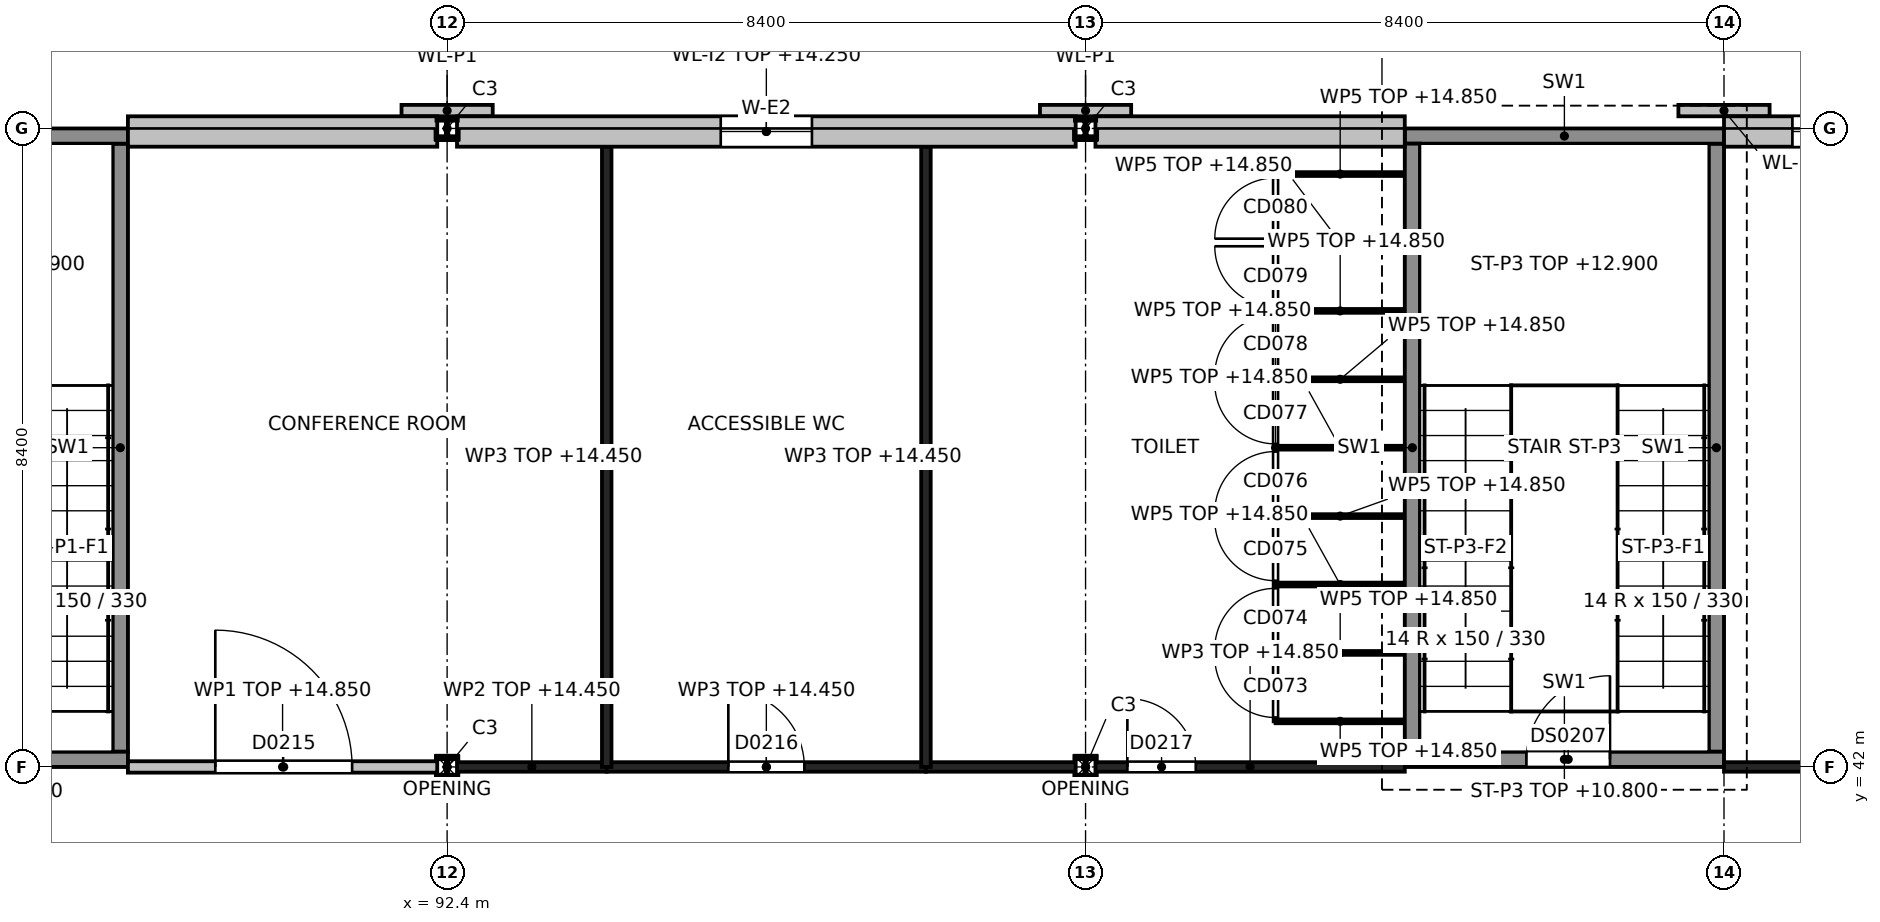
"""IFC4 building model, lengths in metres.
Left out: names, types, materials, properties, quantities, classifications, styles, units other than length and angle.
Written with IfcOpenShell. Run it as: python <this file> out.ifc"""

import sys

from ifc_helpers import new_model, si_unit, direction, frame, frame_2d, origin, origin_2d, place, context, subcontext, project, spatial, rectangle, i_section, extrude, element, fill, save


model = new_model("IFC4")
c1 = context("Model", 3, precision=1e-05, world=origin(), true_north=direction((0.0, 1.0)))
c2 = subcontext(c1, "Body", "Model", "MODEL_VIEW")
j1 = project(units=[si_unit("LENGTHUNIT", "METRE"), si_unit("PLANEANGLEUNIT", "RADIAN")], contexts=[c1])
p1 = place(None, origin())
s1 = spatial("IfcSite", under=j1, at=p1, CompositionType="ELEMENT")
p2 = place(p1, origin())
s2 = spatial("IfcBuilding", under=s1, at=p2, CompositionType="ELEMENT")
p3 = place(p2, frame((0.0, 0.0, 10.8)))
s3 = spatial("IfcBuildingStorey", under=s2, at=p3, CompositionType="ELEMENT", Elevation=10.8)
for number, where, z_axis, x_axis in (
    (1, (92.4, 42.0, 0.0), (0.0, 0.0, 1.0), (1.0, 0.0, 0.0)),
    (2, (92.4, 50.4, 0.0), (0.0, 0.0, 1.0), (1.0, 0.0, 0.0)),
    (3, (100.8, 42.0, 0.0), (0.0, 0.0, 1.0), (1.0, 0.0, 0.0)),
    (4, (100.8, 50.4, 0.0), (0.0, 0.0, 1.0), (1.0, 0.0, 0.0)),
):
    element("IfcColumn", number, at=place(p3, frame(where, z_axis=z_axis, x_axis=x_axis)), inside=s3, PredefinedType="COLUMN", context=c2, shape_type="SweptSolid", body=[
        extrude(i_section(OverallWidth=0.26, OverallDepth=0.26, WebThickness=0.01, FlangeThickness=0.018, at=origin_2d()), origin(), (0.0, 0.0, 1.0), 4.2),
    ])
p4 = place(p3, frame((84.0, 42.1, 0.0), z_axis=(0.0, 0.0, 1.0), x_axis=(1.0, 0.0, 0.0)))
e5 = element("IfcWall", 5, at=p4, inside=s3, PredefinedType="SHEAR", context=c2, shape_type="SweptSolid", body=[
    extrude(rectangle(XDim=4.2, YDim=0.2, at=frame_2d((2.1, 0.0))), origin(), (0.0, 0.0, 1.0), 4.2),
])
p5 = place(p4, frame((1.6, 0.0, 0.0)))
e6 = element("IfcOpeningElement", 6, at=p5, cuts=e5, PredefinedType="OPENING", context=c2, shape_type="SweptSolid", body=[
    extrude(rectangle(XDim=1.1, YDim=2.1, at=frame_2d((0.55, 1.05))), frame((0.0, 0.1, 0.0), z_axis=(0.0, -1.0, 0.0), x_axis=(1.0, 0.0, 0.0)), (0.0, 0.0, 1.0), 0.2),
])
p6 = place(p3, frame((84.0, 50.3, 0.0), z_axis=(0.0, 0.0, 1.0), x_axis=(1.0, 0.0, 0.0)))
e7 = element("IfcWall", 7, at=p6, inside=s3, PredefinedType="SHEAR", context=c2, shape_type="SweptSolid", body=[
    extrude(rectangle(XDim=4.2, YDim=0.2, at=frame_2d((2.1, 0.0))), origin(), (0.0, 0.0, 1.0), 4.2),
])
p7 = place(p3, frame((88.1, 42.2, 0.0), z_axis=(0.0, 0.0, 1.0), x_axis=(0.0, 1.0, 0.0)))
e8 = element("IfcWall", 8, at=p7, inside=s3, PredefinedType="SHEAR", context=c2, shape_type="SweptSolid", body=[
    extrude(rectangle(XDim=8.0, YDim=0.2, at=frame_2d((4.0, 0.0))), origin(), (0.0, 0.0, 1.0), 4.2),
])
p8 = place(p3, frame((105.0, 42.1, 0.0), z_axis=(0.0, 0.0, 1.0), x_axis=(1.0, 0.0, 0.0)))
e9 = element("IfcWall", 9, at=p8, inside=s3, PredefinedType="SHEAR", context=c2, shape_type="SweptSolid", body=[
    extrude(rectangle(XDim=4.2, YDim=0.2, at=frame_2d((2.1, 0.0))), origin(), (0.0, 0.0, 1.0), 4.2),
])
p9 = place(p8, frame((1.6, 0.0, 0.0)))
e10 = element("IfcOpeningElement", 10, at=p9, cuts=e9, PredefinedType="OPENING", context=c2, shape_type="SweptSolid", body=[
    extrude(rectangle(XDim=1.1, YDim=2.1, at=frame_2d((0.55, 1.05))), frame((0.0, 0.1, 0.0), z_axis=(0.0, -1.0, 0.0), x_axis=(1.0, 0.0, 0.0)), (0.0, 0.0, 1.0), 0.2),
])
p10 = place(p3, frame((105.0, 50.3, 0.0), z_axis=(0.0, 0.0, 1.0), x_axis=(1.0, 0.0, 0.0)))
e11 = element("IfcWall", 11, at=p10, inside=s3, PredefinedType="SHEAR", context=c2, shape_type="SweptSolid", body=[
    extrude(rectangle(XDim=4.2, YDim=0.2, at=frame_2d((2.1, 0.0))), origin(), (0.0, 0.0, 1.0), 4.2),
])
for number, where, z_axis, x_axis in (
    (12, (105.1, 42.2, 0.0), (0.0, 0.0, 1.0), (0.0, 1.0, 0.0)),
    (13, (109.1, 42.2, 0.0), (0.0, 0.0, 1.0), (0.0, 1.0, 0.0)),
):
    element("IfcWall", number, at=place(p3, frame(where, z_axis=z_axis, x_axis=x_axis)), inside=s3, PredefinedType="SHEAR", context=c2, shape_type="SweptSolid", body=[
        extrude(rectangle(XDim=8.0, YDim=0.2, at=frame_2d((4.0, 0.0))), origin(), (0.0, 0.0, 1.0), 4.2),
    ])
p11 = place(p3, frame((88.2, 50.36, 0.0), z_axis=(0.0, 0.0, 1.0), x_axis=(1.0, 0.0, 0.0)))
e14 = element("IfcWall", 14, at=p11, inside=s3, PredefinedType="SOLIDWALL", context=c2, shape_type="SweptSolid", body=[
    extrude(rectangle(XDim=4.07, YDim=0.4, at=frame_2d((2.035, 0.0))), origin(), (0.0, 0.0, 1.0), 3.45),
])
p12 = place(p3, frame((92.53, 50.36, 0.0), z_axis=(0.0, 0.0, 1.0), x_axis=(1.0, 0.0, 0.0)))
e15 = element("IfcWall", 15, at=p12, inside=s3, PredefinedType="SOLIDWALL", context=c2, shape_type="SweptSolid", body=[
    extrude(rectangle(XDim=8.14, YDim=0.4, at=frame_2d((4.07, 0.0))), origin(), (0.0, 0.0, 1.0), 3.45),
])
p13 = place(p12, frame((3.47, 0.0, 0.9)))
e16 = element("IfcOpeningElement", 16, at=p13, cuts=e15, PredefinedType="OPENING", context=c2, shape_type="SweptSolid", body=[
    extrude(rectangle(XDim=1.2, YDim=2.4, at=frame_2d((0.6, 1.2))), frame((0.0, 0.2, 0.0), z_axis=(0.0, -1.0, 0.0), x_axis=(1.0, 0.0, 0.0)), (0.0, 0.0, 1.0), 0.4),
])
p14 = place(p3, frame((100.93, 50.36, 0.0), z_axis=(0.0, 0.0, 1.0), x_axis=(1.0, 0.0, 0.0)))
e17 = element("IfcWall", 17, at=p14, inside=s3, PredefinedType="SOLIDWALL", context=c2, shape_type="SweptSolid", body=[
    extrude(rectangle(XDim=4.07, YDim=0.4, at=frame_2d((2.035, 0.0))), origin(), (0.0, 0.0, 1.0), 3.45),
])
p15 = place(p3, frame((109.2, 50.36, 0.0), z_axis=(0.0, 0.0, 1.0), x_axis=(1.0, 0.0, 0.0)))
e18 = element("IfcWall", 18, at=p15, inside=s3, PredefinedType="SOLIDWALL", context=c2, shape_type="SweptSolid", body=[
    extrude(rectangle(XDim=8.27, YDim=0.4, at=frame_2d((4.135, 0.0))), origin(), (0.0, 0.0, 1.0), 3.45),
])
p16 = place(p15, frame((0.9, 0.0, 0.9)))
e19 = element("IfcOpeningElement", 19, at=p16, cuts=e18, PredefinedType="OPENING", context=c2, shape_type="SweptSolid", body=[
    extrude(rectangle(XDim=3.0, YDim=2.4, at=frame_2d((1.5, 1.2))), frame((0.0, 0.2, 0.0), z_axis=(0.0, -1.0, 0.0), x_axis=(1.0, 0.0, 0.0)), (0.0, 0.0, 1.0), 0.4),
])
p17 = place(p15, frame((4.5, 0.0, 0.9)))
e20 = element("IfcOpeningElement", 20, at=p17, cuts=e18, PredefinedType="OPENING", context=c2, shape_type="SweptSolid", body=[
    extrude(rectangle(XDim=3.0, YDim=2.4, at=frame_2d((1.5, 1.2))), frame((0.0, 0.2, 0.0), z_axis=(0.0, -1.0, 0.0), x_axis=(1.0, 0.0, 0.0)), (0.0, 0.0, 1.0), 0.4),
])
for number, where, z_axis, x_axis in (
    (21, (91.8, 50.635, 0.0), (0.0, 0.0, 1.0), (1.0, 0.0, 0.0)),
    (22, (100.2, 50.635, 0.0), (0.0, 0.0, 1.0), (1.0, 0.0, 0.0)),
    (23, (108.6, 50.635, 0.0), (0.0, 0.0, 1.0), (1.0, 0.0, 0.0)),
):
    element("IfcWall", number, at=place(p3, frame(where, z_axis=z_axis, x_axis=x_axis)), inside=s3, PredefinedType="SOLIDWALL", context=c2, shape_type="SweptSolid", body=[
        extrude(rectangle(XDim=1.2, YDim=0.15, at=frame_2d((0.6, 0.0))), origin(), (0.0, 0.0, 1.0), 4.2),
    ])
p18 = place(p3, frame((88.2, 42.0, 0.0), z_axis=(0.0, 0.0, 1.0), x_axis=(1.0, 0.0, 0.0)))
e24 = element("IfcWall", 24, at=p18, inside=s3, PredefinedType="PARTITIONING", context=c2, shape_type="SweptSolid", body=[
    extrude(rectangle(XDim=4.07, YDim=0.15, at=frame_2d((2.035, 0.0))), origin(), (0.0, 0.0, 1.0), 4.05),
])
p19 = place(p18, frame((1.15, 0.0, 0.0)))
e25 = element("IfcOpeningElement", 25, at=p19, cuts=e24, PredefinedType="OPENING", context=c2, shape_type="SweptSolid", body=[
    extrude(rectangle(XDim=1.8, YDim=2.1, at=frame_2d((0.9, 1.05))), frame((0.0, 0.075, 0.0), z_axis=(0.0, -1.0, 0.0), x_axis=(1.0, 0.0, 0.0)), (0.0, 0.0, 1.0), 0.15),
])
p20 = place(p3, frame((92.53, 42.0, 0.0), z_axis=(0.0, 0.0, 1.0), x_axis=(1.0, 0.0, 0.0)))
e26 = element("IfcWall", 26, at=p20, inside=s3, PredefinedType="PARTITIONING", context=c2, shape_type="SweptSolid", body=[
    extrude(rectangle(XDim=1.97, YDim=0.125, at=frame_2d((0.985, 0.0))), origin(), (0.0, 0.0, 1.0), 3.65),
])
p21 = place(p3, frame((94.5, 42.0, 0.0), z_axis=(0.0, 0.0, 1.0), x_axis=(1.0, 0.0, 0.0)))
e27 = element("IfcWall", 27, at=p21, inside=s3, PredefinedType="PARTITIONING", context=c2, shape_type="SweptSolid", body=[
    extrude(rectangle(XDim=4.2, YDim=0.125, at=frame_2d((2.1, 0.0))), origin(), (0.0, 0.0, 1.0), 3.65),
])
p22 = place(p21, frame((1.6, 0.0, 0.0)))
e28 = element("IfcOpeningElement", 28, at=p22, cuts=e27, PredefinedType="OPENING", context=c2, shape_type="SweptSolid", body=[
    extrude(rectangle(XDim=1.0, YDim=2.1, at=frame_2d((0.5, 1.05))), frame((0.0, 0.062, 0.0), z_axis=(0.0, -1.0, 0.0), x_axis=(1.0, 0.0, 0.0)), (0.0, 0.0, 1.0), 0.125),
])
p23 = place(p3, frame((98.7, 42.0, 0.0), z_axis=(0.0, 0.0, 1.0), x_axis=(1.0, 0.0, 0.0)))
e29 = element("IfcWall", 29, at=p23, inside=s3, PredefinedType="PARTITIONING", context=c2, shape_type="SweptSolid", body=[
    extrude(rectangle(XDim=1.97, YDim=0.125, at=frame_2d((0.985, 0.0))), origin(), (0.0, 0.0, 1.0), 3.65),
])
p24 = place(p3, frame((100.93, 42.0, 0.0), z_axis=(0.0, 0.0, 1.0), x_axis=(1.0, 0.0, 0.0)))
e30 = element("IfcWall", 30, at=p24, inside=s3, PredefinedType="PARTITIONING", context=c2, shape_type="SweptSolid", body=[
    extrude(rectangle(XDim=4.07, YDim=0.125, at=frame_2d((2.035, 0.0))), origin(), (0.0, 0.0, 1.0), 4.05),
])
p25 = place(p24, frame((0.42, 0.0, 0.0)))
e31 = element("IfcOpeningElement", 31, at=p25, cuts=e30, PredefinedType="OPENING", context=c2, shape_type="SweptSolid", body=[
    extrude(rectangle(XDim=0.9, YDim=2.1, at=frame_2d((0.45, 1.05))), frame((0.0, 0.062, 0.0), z_axis=(0.0, -1.0, 0.0), x_axis=(1.0, 0.0, 0.0)), (0.0, 0.0, 1.0), 0.125),
])
p26 = place(p3, frame((109.2, 42.0, 0.0), z_axis=(0.0, 0.0, 1.0), x_axis=(1.0, 0.0, 0.0)))
e32 = element("IfcWall", 32, at=p26, inside=s3, PredefinedType="PARTITIONING", context=c2, shape_type="SweptSolid", body=[
    extrude(rectangle(XDim=8.27, YDim=0.125, at=frame_2d((4.135, 0.0))), origin(), (0.0, 0.0, 1.0), 3.66),
])
p27 = place(p26, frame((3.25, 0.0, 0.0)))
e33 = element("IfcOpeningElement", 33, at=p27, cuts=e32, PredefinedType="OPENING", context=c2, shape_type="SweptSolid", body=[
    extrude(rectangle(XDim=1.8, YDim=2.1, at=frame_2d((0.9, 1.05))), frame((0.0, 0.062, 0.0), z_axis=(0.0, -1.0, 0.0), x_axis=(1.0, 0.0, 0.0)), (0.0, 0.0, 1.0), 0.125),
])
for number, where, z_axis, x_axis in (
    (34, (94.5, 42.0, 0.0), (0.0, 0.0, 1.0), (0.0, 1.0, 0.0)),
    (35, (98.7, 42.0, 0.0), (0.0, 0.0, 1.0), (0.0, 1.0, 0.0)),
):
    element("IfcWall", number, at=place(p3, frame(where, z_axis=z_axis, x_axis=x_axis)), inside=s3, PredefinedType="PARTITIONING", context=c2, shape_type="SweptSolid", body=[
        extrude(rectangle(XDim=8.159, YDim=0.125, at=frame_2d((4.08, 0.0))), origin(), (0.0, 0.0, 1.0), 3.65),
    ])
p28 = place(p3, frame((103.3, 42.6, 0.0), z_axis=(0.0, 0.0, 1.0), x_axis=(0.0, 1.0, 0.0)))
e36 = element("IfcWall", 36, at=p28, inside=s3, PredefinedType="PARTITIONING", context=c2, shape_type="SweptSolid", body=[
    extrude(rectangle(XDim=7.2, YDim=0.05, at=frame_2d((3.6, 0.0))), origin(), (0.0, 0.0, 1.0), 4.05),
])
p29 = place(p28, frame((0.05, 0.0, 0.0)))
e37 = element("IfcOpeningElement", 37, at=p29, cuts=e36, PredefinedType="OPENING", context=c2, shape_type="SweptSolid", body=[
    extrude(rectangle(XDim=0.8, YDim=2.0, at=frame_2d((0.4, 1.0))), frame((0.0, 0.025, 0.0), z_axis=(0.0, -1.0, 0.0), x_axis=(1.0, 0.0, 0.0)), (0.0, 0.0, 1.0), 0.05),
])
p30 = place(p28, frame((0.95, 0.0, 0.0)))
e38 = element("IfcOpeningElement", 38, at=p30, cuts=e36, PredefinedType="OPENING", context=c2, shape_type="SweptSolid", body=[
    extrude(rectangle(XDim=0.8, YDim=2.0, at=frame_2d((0.4, 1.0))), frame((0.0, 0.025, 0.0), z_axis=(0.0, -1.0, 0.0), x_axis=(1.0, 0.0, 0.0)), (0.0, 0.0, 1.0), 0.05),
])
p31 = place(p28, frame((1.85, 0.0, 0.0)))
e39 = element("IfcOpeningElement", 39, at=p31, cuts=e36, PredefinedType="OPENING", context=c2, shape_type="SweptSolid", body=[
    extrude(rectangle(XDim=0.8, YDim=2.0, at=frame_2d((0.4, 1.0))), frame((0.0, 0.025, 0.0), z_axis=(0.0, -1.0, 0.0), x_axis=(1.0, 0.0, 0.0)), (0.0, 0.0, 1.0), 0.05),
])
p32 = place(p28, frame((2.75, 0.0, 0.0)))
e40 = element("IfcOpeningElement", 40, at=p32, cuts=e36, PredefinedType="OPENING", context=c2, shape_type="SweptSolid", body=[
    extrude(rectangle(XDim=0.8, YDim=2.0, at=frame_2d((0.4, 1.0))), frame((0.0, 0.025, 0.0), z_axis=(0.0, -1.0, 0.0), x_axis=(1.0, 0.0, 0.0)), (0.0, 0.0, 1.0), 0.05),
])
p33 = place(p28, frame((3.65, 0.0, 0.0)))
e41 = element("IfcOpeningElement", 41, at=p33, cuts=e36, PredefinedType="OPENING", context=c2, shape_type="SweptSolid", body=[
    extrude(rectangle(XDim=0.8, YDim=2.0, at=frame_2d((0.4, 1.0))), frame((0.0, 0.025, 0.0), z_axis=(0.0, -1.0, 0.0), x_axis=(1.0, 0.0, 0.0)), (0.0, 0.0, 1.0), 0.05),
])
p34 = place(p28, frame((4.55, 0.0, 0.0)))
e42 = element("IfcOpeningElement", 42, at=p34, cuts=e36, PredefinedType="OPENING", context=c2, shape_type="SweptSolid", body=[
    extrude(rectangle(XDim=0.8, YDim=2.0, at=frame_2d((0.4, 1.0))), frame((0.0, 0.025, 0.0), z_axis=(0.0, -1.0, 0.0), x_axis=(1.0, 0.0, 0.0)), (0.0, 0.0, 1.0), 0.05),
])
p35 = place(p28, frame((5.45, 0.0, 0.0)))
e43 = element("IfcOpeningElement", 43, at=p35, cuts=e36, PredefinedType="OPENING", context=c2, shape_type="SweptSolid", body=[
    extrude(rectangle(XDim=0.8, YDim=2.0, at=frame_2d((0.4, 1.0))), frame((0.0, 0.025, 0.0), z_axis=(0.0, -1.0, 0.0), x_axis=(1.0, 0.0, 0.0)), (0.0, 0.0, 1.0), 0.05),
])
p36 = place(p28, frame((6.35, 0.0, 0.0)))
e44 = element("IfcOpeningElement", 44, at=p36, cuts=e36, PredefinedType="OPENING", context=c2, shape_type="SweptSolid", body=[
    extrude(rectangle(XDim=0.8, YDim=2.0, at=frame_2d((0.4, 1.0))), frame((0.0, 0.025, 0.0), z_axis=(0.0, -1.0, 0.0), x_axis=(1.0, 0.0, 0.0)), (0.0, 0.0, 1.0), 0.05),
])
for number, where, z_axis, x_axis in (
    (45, (105.0, 42.6, 0.0), (0.0, 0.0, 1.0), (-1.0, 0.0, 0.0)),
    (46, (105.0, 43.5, 0.0), (0.0, 0.0, 1.0), (-1.0, 0.0, 0.0)),
    (47, (105.0, 44.4, 0.0), (0.0, 0.0, 1.0), (-1.0, 0.0, 0.0)),
    (48, (105.0, 45.3, 0.0), (0.0, 0.0, 1.0), (-1.0, 0.0, 0.0)),
    (49, (105.0, 46.2, 0.0), (0.0, 0.0, 1.0), (-1.0, 0.0, 0.0)),
    (50, (105.0, 47.1, 0.0), (0.0, 0.0, 1.0), (-1.0, 0.0, 0.0)),
    (51, (105.0, 48.0, 0.0), (0.0, 0.0, 1.0), (-1.0, 0.0, 0.0)),
    (52, (105.0, 48.9, 0.0), (0.0, 0.0, 1.0), (-1.0, 0.0, 0.0)),
    (53, (105.0, 49.8, 0.0), (0.0, 0.0, 1.0), (-1.0, 0.0, 0.0)),
):
    element("IfcWall", number, at=place(p3, frame(where, z_axis=z_axis, x_axis=x_axis)), inside=s3, PredefinedType="PARTITIONING", context=c2, shape_type="SweptSolid", body=[
        extrude(rectangle(XDim=1.7, YDim=0.05, at=frame_2d((0.85, 0.0))), origin(), (0.0, 0.0, 1.0), 4.05),
    ])
p37 = place(p13, origin())
e54 = element("IfcWindow", 54, at=p37, inside=s3, PartitioningType="SINGLE_PANEL", PredefinedType="WINDOW", context=c2, shape_type="SweptSolid", body=[
    extrude(rectangle(XDim=1.2, YDim=2.4, at=frame_2d((0.6, 1.2))), frame((0.0, 0.03, 0.0), z_axis=(0.0, -1.0, 0.0), x_axis=(1.0, 0.0, 0.0)), (0.0, 0.0, 1.0), 0.06),
])
fill(e16, e54)
p38 = place(p16, origin())
e55 = element("IfcWindow", 55, at=p38, inside=s3, PartitioningType="SINGLE_PANEL", PredefinedType="WINDOW", context=c2, shape_type="SweptSolid", body=[
    extrude(rectangle(XDim=3.0, YDim=2.4, at=frame_2d((1.5, 1.2))), frame((0.0, 0.03, 0.0), z_axis=(0.0, -1.0, 0.0), x_axis=(1.0, 0.0, 0.0)), (0.0, 0.0, 1.0), 0.06),
])
fill(e19, e55)
p39 = place(p19, origin())
e56 = element("IfcDoor", 56, at=p39, inside=s3, OperationType="DOUBLE_DOOR_DOUBLE_SWING", PredefinedType="DOOR", context=c2, shape_type="SweptSolid", body=[
    extrude(rectangle(XDim=1.8, YDim=2.1, at=frame_2d((0.9, 1.05))), frame((0.0, 0.025, 0.0), z_axis=(0.0, -1.0, 0.0), x_axis=(1.0, 0.0, 0.0)), (0.0, 0.0, 1.0), 0.05),
])
fill(e25, e56)
p40 = place(p22, origin())
e57 = element("IfcDoor", 57, at=p40, inside=s3, OperationType="SINGLE_SWING_LEFT", PredefinedType="DOOR", context=c2, shape_type="SweptSolid", body=[
    extrude(rectangle(XDim=1.0, YDim=2.1, at=frame_2d((0.5, 1.05))), frame((0.0, 0.025, 0.0), z_axis=(0.0, -1.0, 0.0), x_axis=(1.0, 0.0, 0.0)), (0.0, 0.0, 1.0), 0.05),
])
fill(e28, e57)
p41 = place(p25, origin())
e58 = element("IfcDoor", 58, at=p41, inside=s3, OperationType="SINGLE_SWING_LEFT", PredefinedType="DOOR", context=c2, shape_type="SweptSolid", body=[
    extrude(rectangle(XDim=0.9, YDim=2.1, at=frame_2d((0.45, 1.05))), frame((0.0, 0.025, 0.0), z_axis=(0.0, -1.0, 0.0), x_axis=(1.0, 0.0, 0.0)), (0.0, 0.0, 1.0), 0.05),
])
fill(e31, e58)
p42 = place(p9, origin())
e59 = element("IfcDoor", 59, at=p42, inside=s3, OperationType="SINGLE_SWING_RIGHT", PredefinedType="DOOR", context=c2, shape_type="SweptSolid", body=[
    extrude(rectangle(XDim=1.1, YDim=2.1, at=frame_2d((0.55, 1.05))), frame((0.0, 0.025, 0.0), z_axis=(0.0, -1.0, 0.0), x_axis=(1.0, 0.0, 0.0)), (0.0, 0.0, 1.0), 0.05),
])
fill(e10, e59)
p43 = place(p29, origin())
e60 = element("IfcDoor", 60, at=p43, inside=s3, OperationType="SINGLE_SWING_RIGHT", PredefinedType="DOOR", context=c2, shape_type="SweptSolid", body=[
    extrude(rectangle(XDim=0.8, YDim=2.0, at=frame_2d((0.4, 1.0))), frame((0.0, 0.025, 0.0), z_axis=(0.0, -1.0, 0.0), x_axis=(1.0, 0.0, 0.0)), (0.0, 0.0, 1.0), 0.05),
])
fill(e37, e60)
p44 = place(p30, origin())
e61 = element("IfcDoor", 61, at=p44, inside=s3, OperationType="SINGLE_SWING_LEFT", PredefinedType="DOOR", context=c2, shape_type="SweptSolid", body=[
    extrude(rectangle(XDim=0.8, YDim=2.0, at=frame_2d((0.4, 1.0))), frame((0.0, 0.025, 0.0), z_axis=(0.0, -1.0, 0.0), x_axis=(1.0, 0.0, 0.0)), (0.0, 0.0, 1.0), 0.05),
])
fill(e38, e61)
p45 = place(p31, origin())
e62 = element("IfcDoor", 62, at=p45, inside=s3, OperationType="SINGLE_SWING_RIGHT", PredefinedType="DOOR", context=c2, shape_type="SweptSolid", body=[
    extrude(rectangle(XDim=0.8, YDim=2.0, at=frame_2d((0.4, 1.0))), frame((0.0, 0.025, 0.0), z_axis=(0.0, -1.0, 0.0), x_axis=(1.0, 0.0, 0.0)), (0.0, 0.0, 1.0), 0.05),
])
fill(e39, e62)
p46 = place(p32, origin())
e63 = element("IfcDoor", 63, at=p46, inside=s3, OperationType="SINGLE_SWING_LEFT", PredefinedType="DOOR", context=c2, shape_type="SweptSolid", body=[
    extrude(rectangle(XDim=0.8, YDim=2.0, at=frame_2d((0.4, 1.0))), frame((0.0, 0.025, 0.0), z_axis=(0.0, -1.0, 0.0), x_axis=(1.0, 0.0, 0.0)), (0.0, 0.0, 1.0), 0.05),
])
fill(e40, e63)
p47 = place(p33, origin())
e64 = element("IfcDoor", 64, at=p47, inside=s3, OperationType="SINGLE_SWING_RIGHT", PredefinedType="DOOR", context=c2, shape_type="SweptSolid", body=[
    extrude(rectangle(XDim=0.8, YDim=2.0, at=frame_2d((0.4, 1.0))), frame((0.0, 0.025, 0.0), z_axis=(0.0, -1.0, 0.0), x_axis=(1.0, 0.0, 0.0)), (0.0, 0.0, 1.0), 0.05),
])
fill(e41, e64)
p48 = place(p34, origin())
e65 = element("IfcDoor", 65, at=p48, inside=s3, OperationType="SINGLE_SWING_LEFT", PredefinedType="DOOR", context=c2, shape_type="SweptSolid", body=[
    extrude(rectangle(XDim=0.8, YDim=2.0, at=frame_2d((0.4, 1.0))), frame((0.0, 0.025, 0.0), z_axis=(0.0, -1.0, 0.0), x_axis=(1.0, 0.0, 0.0)), (0.0, 0.0, 1.0), 0.05),
])
fill(e42, e65)
p49 = place(p35, origin())
e66 = element("IfcDoor", 66, at=p49, inside=s3, OperationType="SINGLE_SWING_RIGHT", PredefinedType="DOOR", context=c2, shape_type="SweptSolid", body=[
    extrude(rectangle(XDim=0.8, YDim=2.0, at=frame_2d((0.4, 1.0))), frame((0.0, 0.025, 0.0), z_axis=(0.0, -1.0, 0.0), x_axis=(1.0, 0.0, 0.0)), (0.0, 0.0, 1.0), 0.05),
])
fill(e43, e66)
p50 = place(p36, origin())
e67 = element("IfcDoor", 67, at=p50, inside=s3, OperationType="SINGLE_SWING_LEFT", PredefinedType="DOOR", context=c2, shape_type="SweptSolid", body=[
    extrude(rectangle(XDim=0.8, YDim=2.0, at=frame_2d((0.4, 1.0))), frame((0.0, 0.025, 0.0), z_axis=(0.0, -1.0, 0.0), x_axis=(1.0, 0.0, 0.0)), (0.0, 0.0, 1.0), 0.05),
])
fill(e44, e67)
save(model, sys.argv[1])
